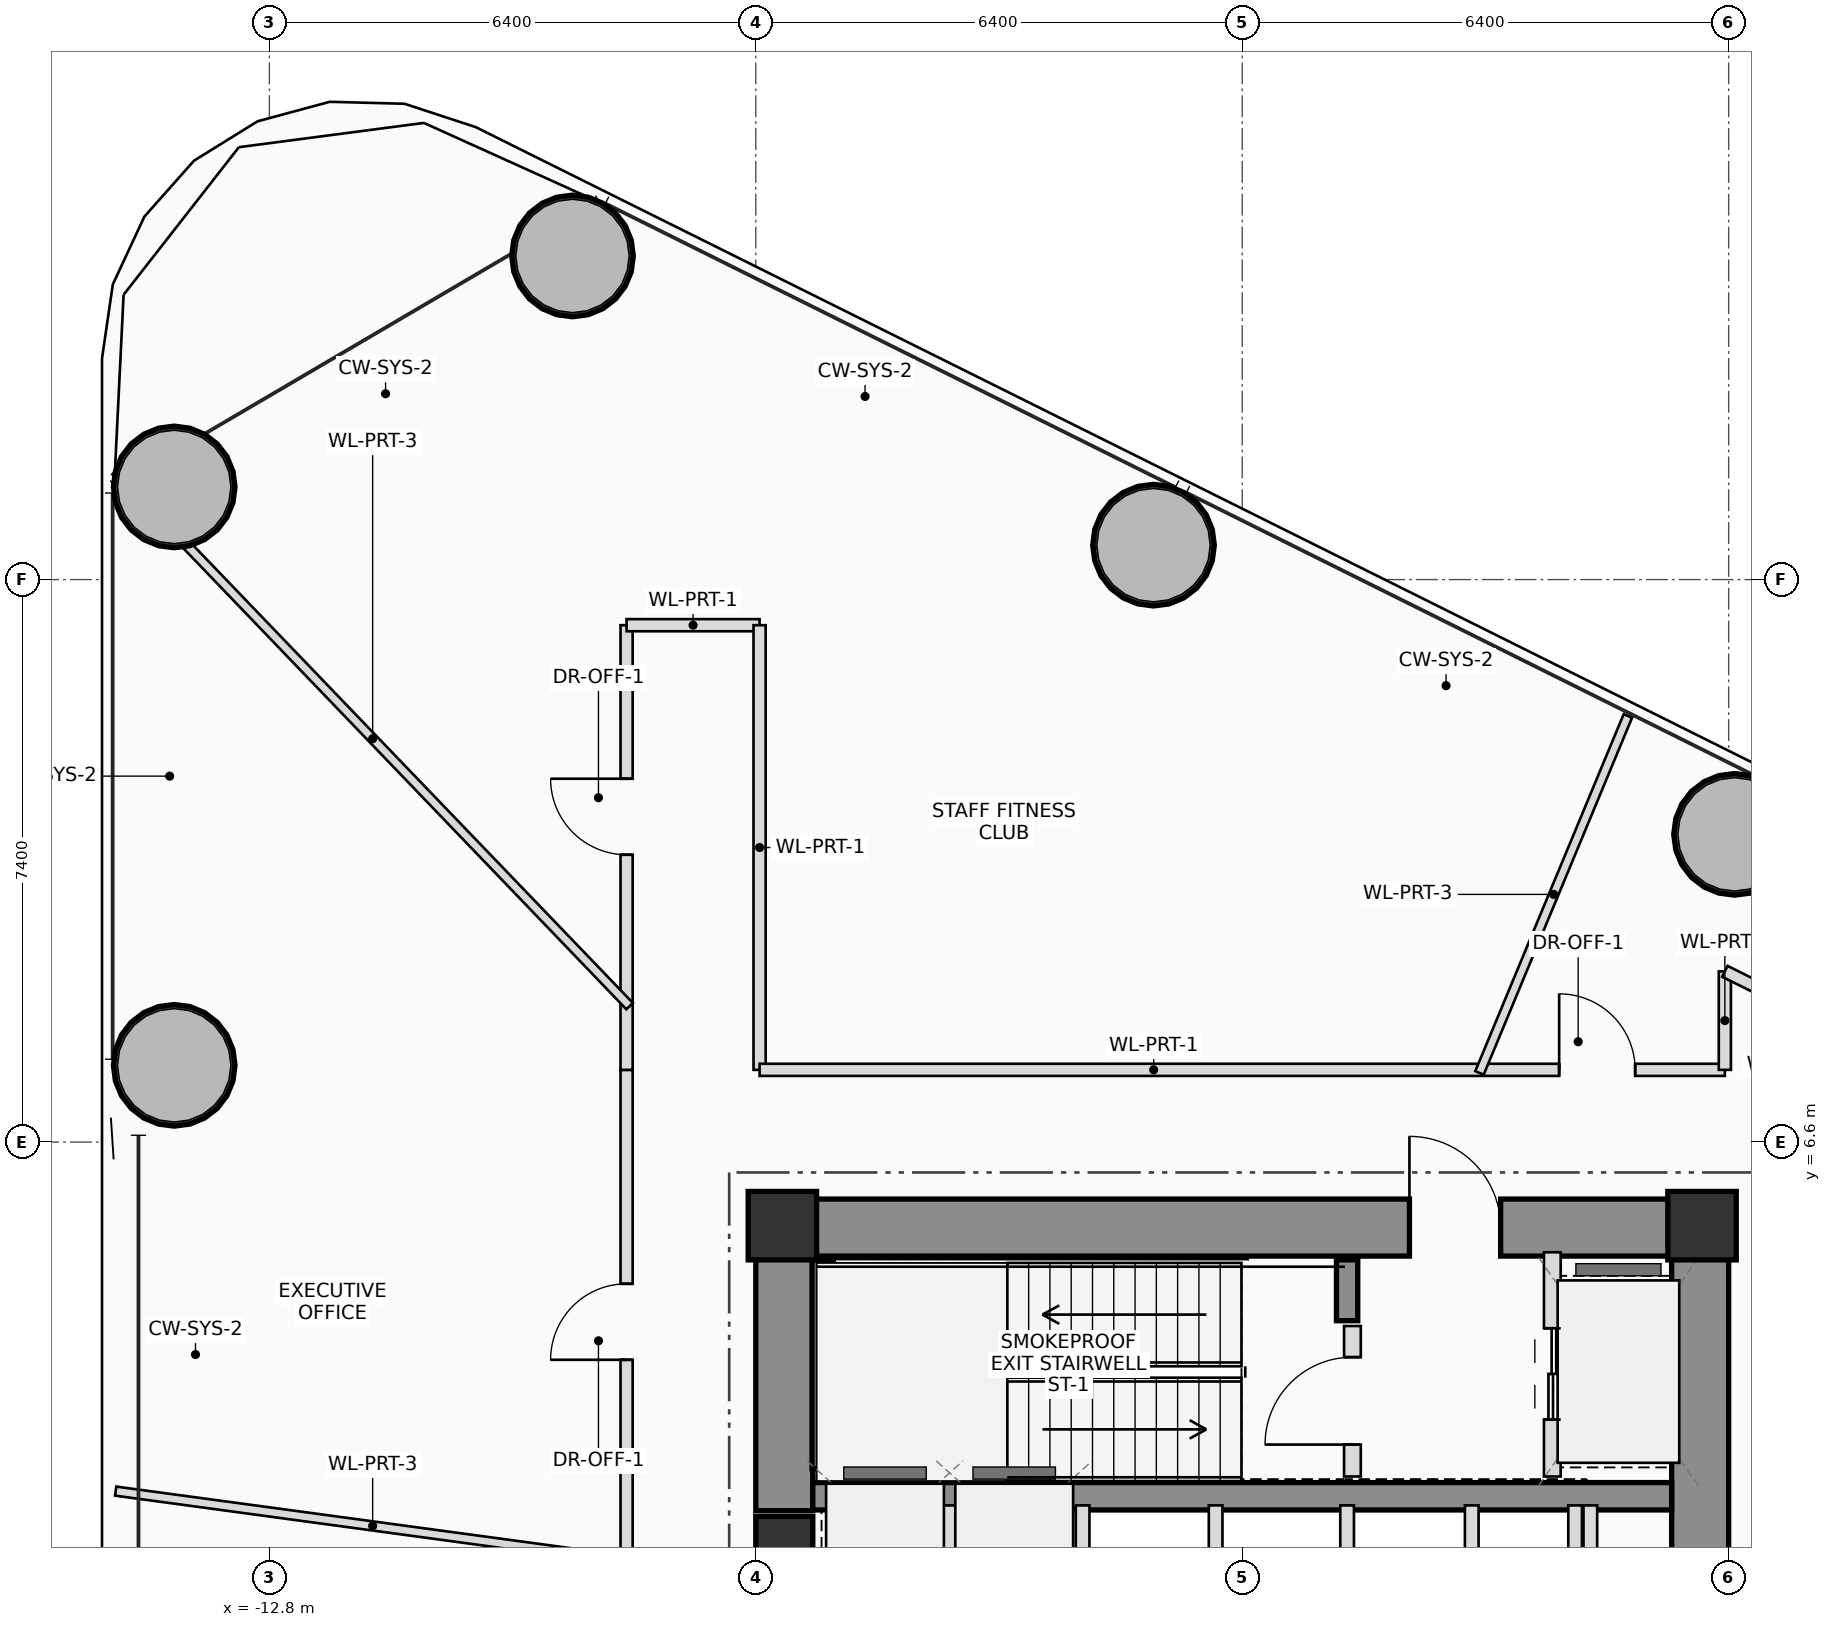
"""IFC4 building model, lengths in metres.
Left out: names, types, materials, properties, quantities, classifications, styles, units other than length and angle.
Written with IfcOpenShell. Run it as: python <this file> out.ifc"""

import sys

from ifc_helpers import new_model, si_unit, direction, frame, frame_2d, origin, origin_2d, place, context, subcontext, project, spatial, rectangle, hollow_circle, extrude, source, transform, mapped, element, fill, save


model = new_model("IFC4")
c1 = context("Model", 3, precision=1e-05, world=origin(), true_north=direction((0.0, 1.0)))
c2 = subcontext(c1, "Body", "Model", "MODEL_VIEW")
j1 = project(units=[si_unit("LENGTHUNIT", "METRE"), si_unit("PLANEANGLEUNIT", "RADIAN")], contexts=[c1])
p1 = place(None, origin())
s1 = spatial("IfcSite", under=j1, at=p1, CompositionType="ELEMENT")
p2 = place(p1, origin())
s2 = spatial("IfcBuilding", under=s1, at=p2, CompositionType="ELEMENT")
p3 = place(p2, frame((0.0, 0.0, 38.6)))
s3 = spatial("IfcBuildingStorey", under=s2, at=p3, CompositionType="ELEMENT", Elevation=38.6)
m1 = source(origin(), c2, "Body", "SweptSolid", [
    extrude(rectangle(XDim=0.9, YDim=0.9, at=origin_2d()), origin(), (0.0, 0.0, 1.0), 3.7),
])
for number, where, z_axis, x_axis in (
    (1, (6.05, 5.5, 0.0), (0.0, 0.0, 1.0), (1.0, 0.0, 0.0)),
    (2, (-6.05, 5.5, 0.0), (0.0, 0.0, 1.0), (1.0, 0.0, 0.0)),
):
    element("IfcColumn", number, at=place(p3, frame(where, z_axis=z_axis, x_axis=x_axis)), inside=s3, PredefinedType="COLUMN", context=c2, shape_type="MappedRepresentation", body=[
        mapped(m1, transform((0.0, 0.0, 0.0), scale=1.0)),
    ])
p4 = place(p3, frame((-6.4, 5.475, 0.0), z_axis=(0.0, 0.0, 1.0), x_axis=(1.0, 0.0, 0.0)))
e3 = element("IfcWall", 3, at=p4, inside=s3, PredefinedType="SHEAR", context=c2, shape_type="SweptSolid", body=[
    extrude(rectangle(XDim=12.8, YDim=0.75, at=frame_2d((6.4, 0.0))), origin(), (0.0, 0.0, 1.0), 3.7),
])
p5 = place(p4, frame((8.6, 0.0, 0.0)))
e4 = element("IfcOpeningElement", 4, at=p5, cuts=e3, PredefinedType="OPENING", context=c2, shape_type="SweptSolid", body=[
    extrude(rectangle(XDim=1.2, YDim=2.2, at=frame_2d((0.6, 1.1))), frame((0.0, 0.385, 0.0), z_axis=(0.0, -1.0, 0.0), x_axis=(1.0, 0.0, 0.0)), (0.0, 0.0, 1.0), 0.77),
])
p6 = place(p3, frame((6.025, -5.1, 0.0), z_axis=(0.0, 0.0, 1.0), x_axis=(0.0, 1.0, 0.0)))
e5 = element("IfcWall", 5, at=p6, inside=s3, PredefinedType="SHEAR", context=c2, shape_type="SweptSolid", body=[
    extrude(rectangle(XDim=10.2, YDim=0.75, at=frame_2d((5.1, 0.0))), origin(), (0.0, 0.0, 1.0), 3.7),
])
p7 = place(p3, frame((-6.025, 1.75, 0.0), z_axis=(0.0, 0.0, 1.0), x_axis=(0.0, 1.0, 0.0)))
e6 = element("IfcWall", 6, at=p7, inside=s3, PredefinedType="SHEAR", context=c2, shape_type="SweptSolid", body=[
    extrude(rectangle(XDim=3.35, YDim=0.75, at=frame_2d((1.675, 0.0))), origin(), (0.0, 0.0, 1.0), 3.7),
])
p8 = place(p3, frame((-5.65, 1.94, 0.0), z_axis=(0.0, 0.0, 1.0), x_axis=(1.0, 0.0, 0.0)))
e7 = element("IfcWall", 7, at=p8, inside=s3, PredefinedType="SHEAR", context=c2, shape_type="SweptSolid", body=[
    extrude(rectangle(XDim=11.3, YDim=0.36, at=frame_2d((5.65, 0.0))), origin(), (0.0, 0.0, 1.0), 3.7),
])
p9 = place(p3, frame((-5.52, 2.3, 0.0), z_axis=(0.0, 0.0, 1.0), x_axis=(0.0, 1.0, 0.0)))
e8 = element("IfcWall", 8, at=p9, inside=s3, PredefinedType="SHEAR", context=c2, shape_type="SweptSolid", body=[
    extrude(rectangle(XDim=2.75, YDim=0.28, at=frame_2d((1.375, 0.0))), origin(), (0.0, 0.0, 1.0), 3.7),
])
p10 = place(p3, frame((1.38, 4.25, 0.0), z_axis=(0.0, 0.0, 1.0), x_axis=(0.0, 1.0, 0.0)))
e9 = element("IfcWall", 9, at=p10, inside=s3, PredefinedType="SHEAR", context=c2, shape_type="SweptSolid", body=[
    extrude(rectangle(XDim=0.8, YDim=0.28, at=frame_2d((0.4, 0.0))), origin(), (0.0, 0.0, 1.0), 3.7),
])
m2 = source(origin(), c2, "Body", "SweptSolid", [
    extrude(rectangle(XDim=0.75, YDim=0.75, at=origin_2d()), origin(), (0.0, 0.0, 1.0), 3.7),
])
p11 = place(p3, frame((-6.025, 1.3, 0.0), z_axis=(0.0, 0.0, 1.0), x_axis=(1.0, 0.0, 0.0)))
e10 = element("IfcColumn", 10, at=p11, inside=s3, PredefinedType="COLUMN", context=c2, shape_type="MappedRepresentation", body=[
    mapped(m2, transform((0.0, 0.0, 0.0), scale=1.0)),
])
m3 = source(origin(), c2, "Body", "SweptSolid", [
    extrude(hollow_circle(Radius=0.8, WallThickness=0.055, at=origin_2d()), origin(), (0.0, 0.0, 1.0), 3.7),
])
for number, where, z_axis, x_axis in (
    (11, (6.477, 10.648, 0.0), (0.0, 0.0, 1.0), (1.0, 0.0, 0.0)),
    (12, (-1.167, 14.453, 0.0), (0.0, 0.0, 1.0), (1.0, 0.0, 0.0)),
    (13, (-8.812, 18.258, 0.0), (0.0, 0.0, 1.0), (1.0, 0.0, 0.0)),
    (14, (-14.052, 15.219, 0.0), (0.0, 0.0, 1.0), (1.0, 0.0, 0.0)),
    (15, (-14.052, 7.61, 0.0), (0.0, 0.0, 1.0), (1.0, 0.0, 0.0)),
):
    element("IfcColumn", number, at=place(p3, frame(where, z_axis=z_axis, x_axis=x_axis)), inside=s3, PredefinedType="COLUMN", context=c2, shape_type="MappedRepresentation", body=[
        mapped(m3, transform((0.0, 0.0, 0.0), scale=1.0)),
    ])
p12 = place(p3, frame((1.45, 2.2, 0.0), z_axis=(0.0, 0.0, 1.0), x_axis=(0.0, 1.0, 0.0)))
e16 = element("IfcWall", 16, at=p12, inside=s3, PredefinedType="PLUMBINGWALL", context=c2, shape_type="SweptSolid", body=[
    extrude(rectangle(XDim=1.98, YDim=0.22, at=frame_2d((0.99, 0.0))), origin(), (0.0, 0.0, 1.0), 3.495),
])
p13 = place(p12, frame((0.42, 0.0, 0.0)))
e17 = element("IfcOpeningElement", 17, at=p13, cuts=e16, PredefinedType="OPENING", context=c2, shape_type="SweptSolid", body=[
    extrude(rectangle(XDim=1.15, YDim=2.15, at=frame_2d((0.575, 1.075))), frame((0.0, 0.12, 0.0), z_axis=(0.0, -1.0, 0.0), x_axis=(1.0, 0.0, 0.0)), (0.0, 0.0, 1.0), 0.24),
])
p14 = place(p3, frame((4.08, 2.2, 0.0), z_axis=(0.0, 0.0, 1.0), x_axis=(0.0, 1.0, 0.0)))
e18 = element("IfcWall", 18, at=p14, inside=s3, PredefinedType="PLUMBINGWALL", context=c2, shape_type="SweptSolid", body=[
    extrude(rectangle(XDim=2.95, YDim=0.22, at=frame_2d((1.475, 0.0))), origin(), (0.0, 0.0, 1.0), 3.495),
])
p15 = place(p14, frame((0.75, 0.0, 0.0)))
e19 = element("IfcOpeningElement", 19, at=p15, cuts=e18, PredefinedType="OPENING", context=c2, shape_type="SweptSolid", body=[
    extrude(rectangle(XDim=1.2, YDim=2.25, at=frame_2d((0.6, 1.125))), frame((0.0, 0.12, 0.0), z_axis=(0.0, -1.0, 0.0), x_axis=(1.0, 0.0, 0.0)), (0.0, 0.0, 1.0), 0.24),
])
for number, where, z_axis, x_axis in (
    (20, (-3.85, 0.84, 0.0), (0.0, 0.0, 1.0), (0.0, 1.0, 0.0)),
    (21, (-2.1, 0.84, 0.0), (0.0, 0.0, 1.0), (0.0, 1.0, 0.0)),
    (22, (-0.35, 0.84, 0.0), (0.0, 0.0, 1.0), (0.0, 1.0, 0.0)),
    (23, (1.38, 0.84, 0.0), (0.0, 0.0, 1.0), (0.0, 1.0, 0.0)),
    (24, (3.02, 0.84, 0.0), (0.0, 0.0, 1.0), (0.0, 1.0, 0.0)),
    (25, (4.38, 0.84, 0.0), (0.0, 0.0, 1.0), (0.0, 1.0, 0.0)),
):
    element("IfcWall", number, at=place(p3, frame(where, z_axis=z_axis, x_axis=x_axis)), inside=s3, PredefinedType="PLUMBINGWALL", context=c2, shape_type="SweptSolid", body=[
        extrude(rectangle(XDim=0.98, YDim=0.18, at=frame_2d((0.49, 0.0))), origin(), (0.0, 0.0, 1.0), 3.495),
    ])
p16 = place(p3, frame((4.58, -1.82, 0.0), z_axis=(0.0, 0.0, 1.0), x_axis=(0.0, 1.0, 0.0)))
e26 = element("IfcWall", 26, at=p16, inside=s3, PredefinedType="PLUMBINGWALL", context=c2, shape_type="SweptSolid", body=[
    extrude(rectangle(XDim=3.64, YDim=0.18, at=frame_2d((1.82, 0.0))), origin(), (0.0, 0.0, 1.0), 3.495),
])
p17 = place(p16, frame((1.35, 0.0, 0.0)))
e27 = element("IfcOpeningElement", 27, at=p17, cuts=e26, PredefinedType="OPENING", context=c2, shape_type="SweptSolid", body=[
    extrude(rectangle(XDim=0.9, YDim=2.05, at=frame_2d((0.45, 1.025))), frame((0.0, 0.1, 0.0), z_axis=(0.0, -1.0, 0.0), x_axis=(1.0, 0.0, 0.0)), (0.0, 0.0, 1.0), 0.2),
])
p18 = place(p3, frame((-8.1, -7.55, 0.0), z_axis=(0.0, 0.0, 1.0), x_axis=(0.0, 1.0, 0.0)))
e28 = element("IfcWall", 28, at=p18, inside=s3, PredefinedType="PARTITIONING", context=c2, shape_type="SweptSolid", body=[
    extrude(rectangle(XDim=15.1, YDim=0.16, at=frame_2d((7.55, 0.0))), origin(), (0.0, 0.0, 1.0), 2.8),
])
p19 = place(p18, frame((11.285, 0.0, 0.0)))
e29 = element("IfcOpeningElement", 29, at=p19, cuts=e28, PredefinedType="OPENING", context=c2, shape_type="SweptSolid", body=[
    extrude(rectangle(XDim=1.0, YDim=2.25, at=frame_2d((0.5, 1.125))), frame((0.0, 0.09, 0.0), z_axis=(0.0, -1.0, 0.0), x_axis=(1.0, 0.0, 0.0)), (0.0, 0.0, 1.0), 0.18),
])
p20 = place(p3, frame((-8.1, 7.55, 0.0), z_axis=(0.0, 0.0, 1.0), x_axis=(0.0, 1.0, 0.0)))
e30 = element("IfcWall", 30, at=p20, inside=s3, PredefinedType="PARTITIONING", context=c2, shape_type="SweptSolid", body=[
    extrude(rectangle(XDim=5.85, YDim=0.16, at=frame_2d((2.925, 0.0))), origin(), (0.0, 0.0, 1.0), 2.8),
])
p21 = place(p20, frame((2.83, 0.0, 0.0)))
e31 = element("IfcOpeningElement", 31, at=p21, cuts=e30, PredefinedType="OPENING", context=c2, shape_type="SweptSolid", body=[
    extrude(rectangle(XDim=1.0, YDim=2.25, at=frame_2d((0.5, 1.125))), frame((0.0, 0.09, 0.0), z_axis=(0.0, -1.0, 0.0), x_axis=(1.0, 0.0, 0.0)), (0.0, 0.0, 1.0), 0.18),
])
p22 = place(p3, frame((-8.1, 13.4, 0.0), z_axis=(0.0, 0.0, 1.0), x_axis=(1.0, 0.0, 0.0)))
e32 = element("IfcWall", 32, at=p22, inside=s3, PredefinedType="PARTITIONING", context=c2, shape_type="SweptSolid", body=[
    extrude(rectangle(XDim=1.75, YDim=0.16, at=frame_2d((0.875, 0.0))), origin(), (0.0, 0.0, 1.0), 2.8),
])
p23 = place(p3, frame((-6.35, 13.4, 0.0), z_axis=(0.0, 0.0, 1.0), x_axis=(0.0, -1.0, 0.0)))
e33 = element("IfcWall", 33, at=p23, inside=s3, PredefinedType="PARTITIONING", context=c2, shape_type="SweptSolid", body=[
    extrude(rectangle(XDim=5.85, YDim=0.16, at=frame_2d((2.925, 0.0))), origin(), (0.0, 0.0, 1.0), 2.8),
])
p24 = place(p3, frame((-6.35, 7.55, 0.0), z_axis=(0.0, 0.0, 1.0), x_axis=(1.0, 0.0, 0.0)))
e34 = element("IfcWall", 34, at=p24, inside=s3, PredefinedType="PARTITIONING", context=c2, shape_type="SweptSolid", body=[
    extrude(rectangle(XDim=12.7, YDim=0.16, at=frame_2d((6.35, 0.0))), origin(), (0.0, 0.0, 1.0), 2.8),
])
p25 = place(p24, frame((10.52, 0.0, 0.0)))
e35 = element("IfcOpeningElement", 35, at=p25, cuts=e34, PredefinedType="OPENING", context=c2, shape_type="SweptSolid", body=[
    extrude(rectangle(XDim=1.0, YDim=2.25, at=frame_2d((0.5, 1.125))), frame((0.0, 0.09, 0.0), z_axis=(0.0, -1.0, 0.0), x_axis=(1.0, 0.0, 0.0)), (0.0, 0.0, 1.0), 0.18),
])
p26 = place(p3, frame((6.35, 7.55, 0.0), z_axis=(0.0, 0.0, 1.0), x_axis=(0.0, 1.0, 0.0)))
e36 = element("IfcWall", 36, at=p26, inside=s3, PredefinedType="PARTITIONING", context=c2, shape_type="SweptSolid", body=[
    extrude(rectangle(XDim=1.296, YDim=0.16, at=frame_2d((0.648, 0.0))), origin(), (0.0, 0.0, 1.0), 2.8),
])
p27 = place(p3, frame((6.35, 8.846, 0.0), z_axis=(0.0, 0.0, 1.0), x_axis=(0.89527489017, -0.445514164793, 0.0)))
e37 = element("IfcWall", 37, at=p27, inside=s3, PredefinedType="PARTITIONING", context=c2, shape_type="SweptSolid", body=[
    extrude(rectangle(XDim=1.955, YDim=0.16, at=frame_2d((0.977, 0.0))), origin(), (0.0, 0.0, 1.0), 2.8),
])
p28 = place(p3, frame((3.122, 7.51, 0.0), z_axis=(0.0, 0.0, 1.0), x_axis=(0.383885926118, 0.923380525963, 0.0)))
e38 = element("IfcWall", 38, at=p28, inside=s3, PredefinedType="PARTITIONING", context=c2, shape_type="SweptSolid", body=[
    extrude(rectangle(XDim=5.086, YDim=0.12, at=frame_2d((2.543, 0.0))), origin(), (0.0, 0.0, 1.0), 2.96),
])
p29 = place(p3, frame((-8.06, 8.388, 0.0), z_axis=(0.0, 0.0, 1.0), x_axis=(-0.692869708489, 0.721062803823, 0.0)))
e39 = element("IfcWall", 39, at=p29, inside=s3, PredefinedType="PARTITIONING", context=c2, shape_type="SweptSolid", body=[
    extrude(rectangle(XDim=9.759, YDim=0.12, at=frame_2d((4.88, 0.0))), origin(), (0.0, 0.0, 1.0), 2.8),
])
p30 = place(p3, frame((-8.06, 1.092, 0.0), z_axis=(0.0, 0.0, 1.0), x_axis=(-0.990948874496, 0.13423981576, 0.0)))
e40 = element("IfcWall", 40, at=p30, inside=s3, PredefinedType="PARTITIONING", context=c2, shape_type="SweptSolid", body=[
    extrude(rectangle(XDim=6.824, YDim=0.12, at=frame_2d((3.412, 0.0))), origin(), (0.0, 0.0, 1.0), 2.96),
])
p31 = place(p5, origin())
e41 = element("IfcDoor", 41, at=p31, inside=s3, OperationType="SINGLE_SWING_LEFT", PredefinedType="DOOR", context=c2, shape_type="SweptSolid", body=[
    extrude(rectangle(XDim=1.2, YDim=2.2, at=frame_2d((0.6, 1.1))), frame((0.0, 0.025, 0.0), z_axis=(0.0, -1.0, 0.0), x_axis=(1.0, 0.0, 0.0)), (0.0, 0.0, 1.0), 0.05),
])
fill(e4, e41)
p32 = place(p13, origin())
e42 = element("IfcDoor", 42, at=p32, inside=s3, OperationType="SINGLE_SWING_LEFT", PredefinedType="DOOR", context=c2, shape_type="SweptSolid", body=[
    extrude(rectangle(XDim=1.15, YDim=2.15, at=frame_2d((0.575, 1.075))), frame((0.0, 0.025, 0.0), z_axis=(0.0, -1.0, 0.0), x_axis=(1.0, 0.0, 0.0)), (0.0, 0.0, 1.0), 0.05),
])
fill(e17, e42)
p33 = place(p15, origin())
e43 = element("IfcDoor", 43, at=p33, inside=s3, OperationType="DOUBLE_DOOR_SLIDING", PredefinedType="DOOR", context=c2, shape_type="SweptSolid", body=[
    extrude(rectangle(XDim=1.2, YDim=2.25, at=frame_2d((0.6, 1.125))), frame((0.0, 0.025, 0.0), z_axis=(0.0, -1.0, 0.0), x_axis=(1.0, 0.0, 0.0)), (0.0, 0.0, 1.0), 0.05),
])
fill(e19, e43)
p34 = place(p19, origin())
e44 = element("IfcDoor", 44, at=p34, inside=s3, OperationType="SINGLE_SWING_LEFT", PredefinedType="DOOR", context=c2, shape_type="SweptSolid", body=[
    extrude(rectangle(XDim=1.0, YDim=2.25, at=frame_2d((0.5, 1.125))), frame((0.0, 0.025, 0.0), z_axis=(0.0, -1.0, 0.0), x_axis=(1.0, 0.0, 0.0)), (0.0, 0.0, 1.0), 0.05),
])
fill(e29, e44)
p35 = place(p21, origin())
e45 = element("IfcDoor", 45, at=p35, inside=s3, OperationType="SINGLE_SWING_RIGHT", PredefinedType="DOOR", context=c2, shape_type="SweptSolid", body=[
    extrude(rectangle(XDim=1.0, YDim=2.25, at=frame_2d((0.5, 1.125))), frame((0.0, 0.025, 0.0), z_axis=(0.0, -1.0, 0.0), x_axis=(1.0, 0.0, 0.0)), (0.0, 0.0, 1.0), 0.05),
])
fill(e31, e45)
p36 = place(p25, origin())
e46 = element("IfcDoor", 46, at=p36, inside=s3, OperationType="SINGLE_SWING_LEFT", PredefinedType="DOOR", context=c2, shape_type="SweptSolid", body=[
    extrude(rectangle(XDim=1.0, YDim=2.25, at=frame_2d((0.5, 1.125))), frame((0.0, 0.025, 0.0), z_axis=(0.0, -1.0, 0.0), x_axis=(1.0, 0.0, 0.0)), (0.0, 0.0, 1.0), 0.05),
])
fill(e35, e46)
save(model, sys.argv[1])
